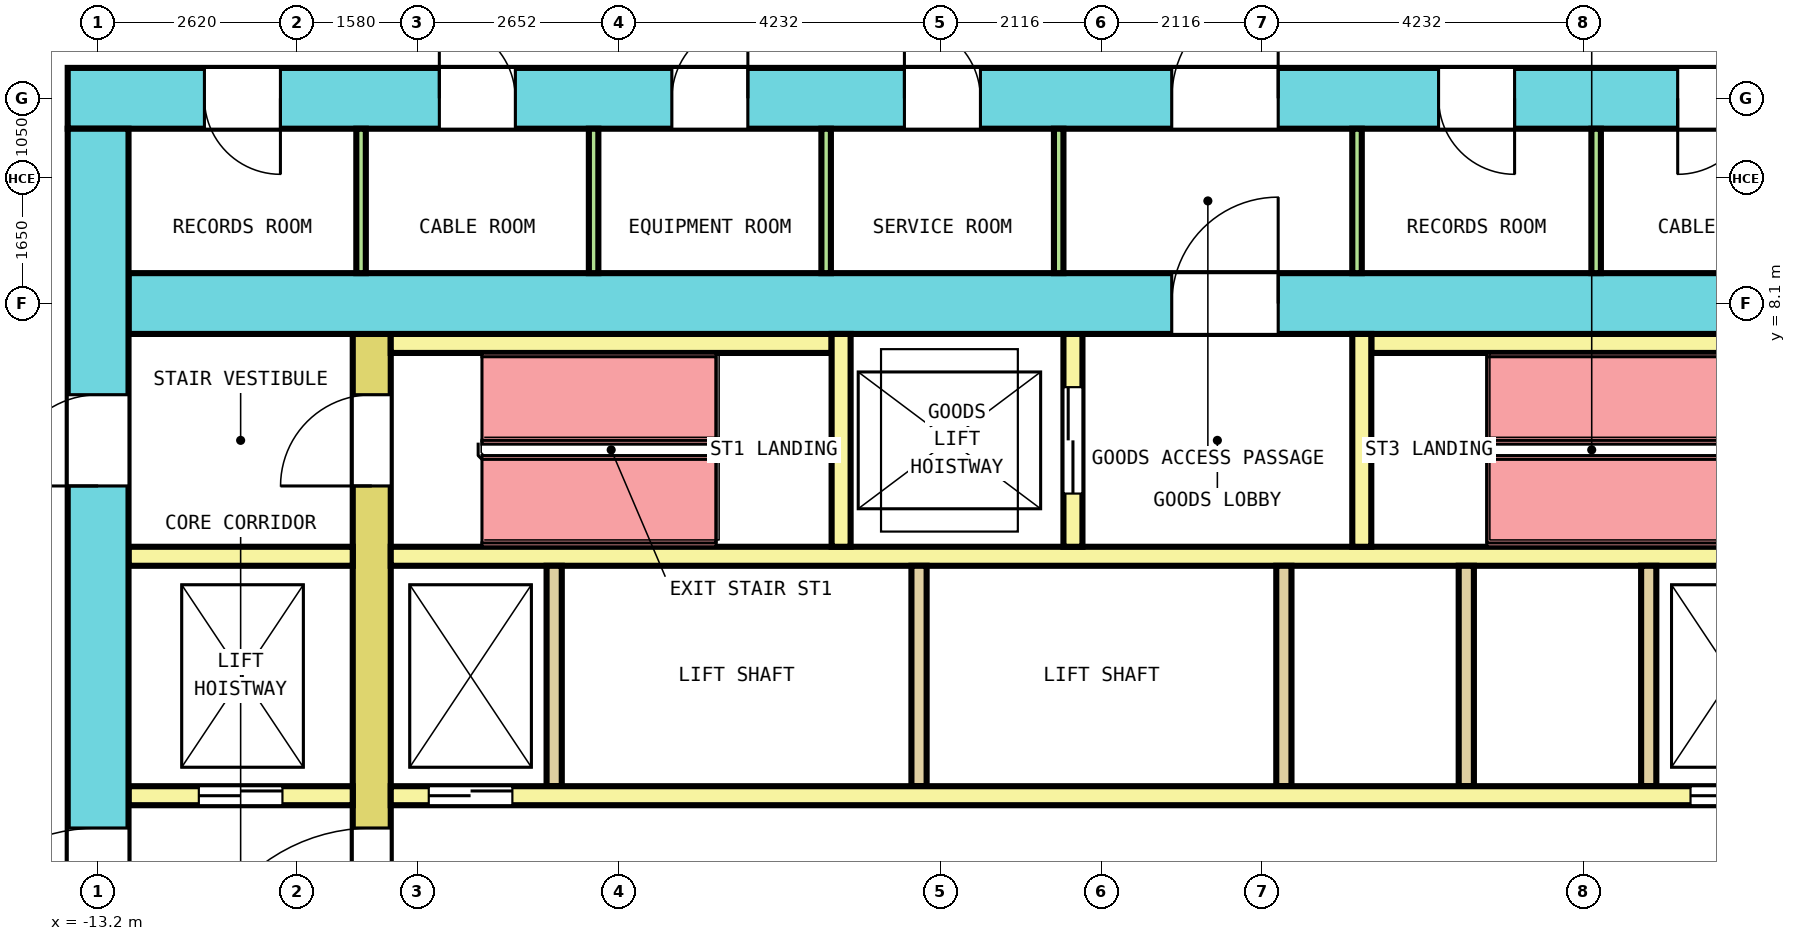
"""IFC4 building model, lengths in metres.
Left out: names, types, materials, properties, quantities, classifications, styles, units other than length and angle.
Written with IfcOpenShell. Run it as: python <this file> out.ifc"""

import sys

from ifc_helpers import new_model, si_unit, direction, frame, frame_2d, origin, place, context, subcontext, project, spatial, rectangle, extrude, element, fill, save


model = new_model("IFC4")
c1 = context("Model", 3, precision=1e-05, world=origin(), true_north=direction((0.0, 1.0)))
c2 = subcontext(c1, "Body", "Model", "MODEL_VIEW")
j1 = project(units=[si_unit("LENGTHUNIT", "METRE"), si_unit("PLANEANGLEUNIT", "RADIAN")], contexts=[c1])
p1 = place(None, origin())
s1 = spatial("IfcSite", under=j1, at=p1, CompositionType="ELEMENT")
p2 = place(p1, origin())
s2 = spatial("IfcBuilding", under=s1, at=p2, CompositionType="ELEMENT")
p3 = place(p2, frame((0.0, 0.0, 94.0)))
s3 = spatial("IfcBuildingStorey", under=s2, at=p3, CompositionType="ELEMENT", Elevation=94.0)
p4 = place(p3, frame((-13.6, 10.8, 0.0), z_axis=(0.0, 0.0, 1.0), x_axis=(1.0, 0.0, 0.0)))
e1 = element("IfcWall", 1, at=p4, inside=s3, PredefinedType="SHEAR", context=c2, shape_type="SweptSolid", body=[
    extrude(rectangle(XDim=27.2, YDim=0.8, at=frame_2d((13.6, 0.0))), origin(), (0.0, 0.0, 1.0), 4.1),
])
p5 = place(p4, frame((1.798, 0.0, 0.0)))
e2 = element("IfcOpeningElement", 2, at=p5, cuts=e1, PredefinedType="OPENING", context=c2, shape_type="SweptSolid", body=[
    extrude(rectangle(XDim=1.0, YDim=2.1, at=frame_2d((0.5, 1.05))), frame((0.0, 0.41, 0.0), z_axis=(0.0, -1.0, 0.0), x_axis=(1.0, 0.0, 0.0)), (0.0, 0.0, 1.0), 0.82),
])
p6 = place(p4, frame((4.889, 0.0, 0.0)))
e3 = element("IfcOpeningElement", 3, at=p6, cuts=e1, PredefinedType="OPENING", context=c2, shape_type="SweptSolid", body=[
    extrude(rectangle(XDim=1.0, YDim=2.1, at=frame_2d((0.5, 1.05))), frame((0.0, 0.41, 0.0), z_axis=(0.0, -1.0, 0.0), x_axis=(1.0, 0.0, 0.0)), (0.0, 0.0, 1.0), 0.82),
])
p7 = place(p4, frame((7.948, 0.0, 0.0)))
e4 = element("IfcOpeningElement", 4, at=p7, cuts=e1, PredefinedType="OPENING", context=c2, shape_type="SweptSolid", body=[
    extrude(rectangle(XDim=1.0, YDim=2.1, at=frame_2d((0.5, 1.05))), frame((0.0, 0.41, 0.0), z_axis=(0.0, -1.0, 0.0), x_axis=(1.0, 0.0, 0.0)), (0.0, 0.0, 1.0), 0.82),
])
p8 = place(p4, frame((11.008, 0.0, 0.0)))
e5 = element("IfcOpeningElement", 5, at=p8, cuts=e1, PredefinedType="OPENING", context=c2, shape_type="SweptSolid", body=[
    extrude(rectangle(XDim=1.0, YDim=2.1, at=frame_2d((0.5, 1.05))), frame((0.0, 0.41, 0.0), z_axis=(0.0, -1.0, 0.0), x_axis=(1.0, 0.0, 0.0)), (0.0, 0.0, 1.0), 0.82),
])
p9 = place(p4, frame((18.035, 0.0, 0.0)))
e6 = element("IfcOpeningElement", 6, at=p9, cuts=e1, PredefinedType="OPENING", context=c2, shape_type="SweptSolid", body=[
    extrude(rectangle(XDim=1.0, YDim=2.1, at=frame_2d((0.5, 1.05))), frame((0.0, 0.41, 0.0), z_axis=(0.0, -1.0, 0.0), x_axis=(1.0, 0.0, 0.0)), (0.0, 0.0, 1.0), 0.82),
])
p10 = place(p4, frame((21.181, 0.0, 0.0)))
e7 = element("IfcOpeningElement", 7, at=p10, cuts=e1, PredefinedType="OPENING", context=c2, shape_type="SweptSolid", body=[
    extrude(rectangle(XDim=1.0, YDim=2.1, at=frame_2d((0.5, 1.05))), frame((0.0, 0.41, 0.0), z_axis=(0.0, -1.0, 0.0), x_axis=(1.0, 0.0, 0.0)), (0.0, 0.0, 1.0), 0.82),
])
p11 = place(p4, frame((24.358, 0.0, 0.0)))
e8 = element("IfcOpeningElement", 8, at=p11, cuts=e1, PredefinedType="OPENING", context=c2, shape_type="SweptSolid", body=[
    extrude(rectangle(XDim=1.0, YDim=2.1, at=frame_2d((0.5, 1.05))), frame((0.0, 0.41, 0.0), z_axis=(0.0, -1.0, 0.0), x_axis=(1.0, 0.0, 0.0)), (0.0, 0.0, 1.0), 0.82),
])
p12 = place(p4, frame((14.525, 0.0, 0.0)))
e9 = element("IfcOpeningElement", 9, at=p12, cuts=e1, PredefinedType="OPENING", context=c2, shape_type="SweptSolid", body=[
    extrude(rectangle(XDim=1.4, YDim=2.1, at=frame_2d((0.7, 1.05))), frame((0.0, 0.41, 0.0), z_axis=(0.0, -1.0, 0.0), x_axis=(1.0, 0.0, 0.0)), (0.0, 0.0, 1.0), 0.82),
])
p13 = place(p3, frame((-13.2, -10.4, 0.0), z_axis=(0.0, 0.0, 1.0), x_axis=(0.0, 1.0, 0.0)))
e10 = element("IfcWall", 10, at=p13, inside=s3, PredefinedType="SHEAR", context=c2, shape_type="SweptSolid", body=[
    extrude(rectangle(XDim=20.8, YDim=0.8, at=frame_2d((10.4, 0.0))), origin(), (0.0, 0.0, 1.0), 4.1),
])
p14 = place(p13, frame((9.2, 0.0, 0.0)))
e11 = element("IfcOpeningElement", 11, at=p14, cuts=e10, PredefinedType="OPENING", context=c2, shape_type="SweptSolid", body=[
    extrude(rectangle(XDim=2.4, YDim=2.1, at=frame_2d((1.2, 1.05))), frame((0.0, 0.41, 0.0), z_axis=(0.0, -1.0, 0.0), x_axis=(1.0, 0.0, 0.0)), (0.0, 0.0, 1.0), 0.82),
])
p15 = place(p13, frame((16.1, 0.0, 0.0)))
e12 = element("IfcOpeningElement", 12, at=p15, cuts=e10, PredefinedType="OPENING", context=c2, shape_type="SweptSolid", body=[
    extrude(rectangle(XDim=1.2, YDim=2.1, at=frame_2d((0.6, 1.05))), frame((0.0, 0.41, 0.0), z_axis=(0.0, -1.0, 0.0), x_axis=(1.0, 0.0, 0.0)), (0.0, 0.0, 1.0), 0.82),
])
p16 = place(p13, frame((3.5, 0.0, 0.0)))
e13 = element("IfcOpeningElement", 13, at=p16, cuts=e10, PredefinedType="OPENING", context=c2, shape_type="SweptSolid", body=[
    extrude(rectangle(XDim=1.2, YDim=2.1, at=frame_2d((0.6, 1.05))), frame((0.0, 0.41, 0.0), z_axis=(0.0, -1.0, 0.0), x_axis=(1.0, 0.0, 0.0)), (0.0, 0.0, 1.0), 0.82),
])
p17 = place(p3, frame((-12.8, 8.1, 0.0), z_axis=(0.0, 0.0, 1.0), x_axis=(1.0, 0.0, 0.0)))
e14 = element("IfcWall", 14, at=p17, inside=s3, PredefinedType="SHEAR", context=c2, shape_type="SweptSolid", body=[
    extrude(rectangle(XDim=25.6, YDim=0.8, at=frame_2d((12.8, 0.0))), origin(), (0.0, 0.0, 1.0), 4.1),
])
p18 = place(p17, frame((13.725, 0.0, 0.0)))
e15 = element("IfcOpeningElement", 15, at=p18, cuts=e14, PredefinedType="OPENING", context=c2, shape_type="SweptSolid", body=[
    extrude(rectangle(XDim=1.4, YDim=2.1, at=frame_2d((0.7, 1.05))), frame((0.0, 0.41, 0.0), z_axis=(0.0, -1.0, 0.0), x_axis=(1.0, 0.0, 0.0)), (0.0, 0.0, 1.0), 0.82),
])
p19 = place(p3, frame((-9.6, -7.7, 0.0), z_axis=(0.0, 0.0, 1.0), x_axis=(0.0, 1.0, 0.0)))
e16 = element("IfcWall", 16, at=p19, inside=s3, PredefinedType="SHEAR", context=c2, shape_type="SweptSolid", body=[
    extrude(rectangle(XDim=15.4, YDim=0.5, at=frame_2d((7.7, 0.0))), origin(), (0.0, 0.0, 1.0), 4.1),
])
p20 = place(p19, frame((6.5, 0.0, 0.0)))
e17 = element("IfcOpeningElement", 17, at=p20, cuts=e16, PredefinedType="OPENING", context=c2, shape_type="SweptSolid", body=[
    extrude(rectangle(XDim=2.4, YDim=2.1, at=frame_2d((1.2, 1.05))), frame((0.0, 0.26, 0.0), z_axis=(0.0, -1.0, 0.0), x_axis=(1.0, 0.0, 0.0)), (0.0, 0.0, 1.0), 0.52),
])
p21 = place(p19, frame((13.4, 0.0, 0.0)))
e18 = element("IfcOpeningElement", 18, at=p21, cuts=e16, PredefinedType="OPENING", context=c2, shape_type="SweptSolid", body=[
    extrude(rectangle(XDim=1.2, YDim=2.1, at=frame_2d((0.6, 1.05))), frame((0.0, 0.26, 0.0), z_axis=(0.0, -1.0, 0.0), x_axis=(1.0, 0.0, 0.0)), (0.0, 0.0, 1.0), 0.52),
])
p22 = place(p19, frame((0.8, 0.0, 0.0)))
e19 = element("IfcOpeningElement", 19, at=p22, cuts=e16, PredefinedType="OPENING", context=c2, shape_type="SweptSolid", body=[
    extrude(rectangle(XDim=1.2, YDim=2.1, at=frame_2d((0.6, 1.05))), frame((0.0, 0.26, 0.0), z_axis=(0.0, -1.0, 0.0), x_axis=(1.0, 0.0, 0.0)), (0.0, 0.0, 1.0), 0.52),
])
p23 = place(p3, frame((-12.8, 1.625, 0.0), z_axis=(0.0, 0.0, 1.0), x_axis=(1.0, 0.0, 0.0)))
e20 = element("IfcWall", 20, at=p23, inside=s3, PredefinedType="SOLIDWALL", context=c2, shape_type="SweptSolid", body=[
    extrude(rectangle(XDim=2.95, YDim=0.25, at=frame_2d((1.475, 0.0))), origin(), (0.0, 0.0, 1.0), 4.1),
])
p24 = place(p23, frame((0.925, 0.0, 0.0)))
e21 = element("IfcOpeningElement", 21, at=p24, cuts=e20, PredefinedType="OPENING", context=c2, shape_type="SweptSolid", body=[
    extrude(rectangle(XDim=1.1, YDim=2.1, at=frame_2d((0.55, 1.05))), frame((0.0, 0.135, 0.0), z_axis=(0.0, -1.0, 0.0), x_axis=(1.0, 0.0, 0.0)), (0.0, 0.0, 1.0), 0.27),
])
p25 = place(p3, frame((-9.35, 1.625, 0.0), z_axis=(0.0, 0.0, 1.0), x_axis=(1.0, 0.0, 0.0)))
e22 = element("IfcWall", 22, at=p25, inside=s3, PredefinedType="SOLIDWALL", context=c2, shape_type="SweptSolid", body=[
    extrude(rectangle(XDim=18.7, YDim=0.25, at=frame_2d((9.35, 0.0))), origin(), (0.0, 0.0, 1.0), 4.1),
])
p26 = place(p25, frame((0.5, 0.0, 0.0)))
e23 = element("IfcOpeningElement", 23, at=p26, cuts=e22, PredefinedType="OPENING", context=c2, shape_type="SweptSolid", body=[
    extrude(rectangle(XDim=1.1, YDim=2.1, at=frame_2d((0.55, 1.05))), frame((0.0, 0.135, 0.0), z_axis=(0.0, -1.0, 0.0), x_axis=(1.0, 0.0, 0.0)), (0.0, 0.0, 1.0), 0.27),
])
p27 = place(p25, frame((17.1, 0.0, 0.0)))
e24 = element("IfcOpeningElement", 24, at=p27, cuts=e22, PredefinedType="OPENING", context=c2, shape_type="SweptSolid", body=[
    extrude(rectangle(XDim=1.1, YDim=2.1, at=frame_2d((0.55, 1.05))), frame((0.0, 0.135, 0.0), z_axis=(0.0, -1.0, 0.0), x_axis=(1.0, 0.0, 0.0)), (0.0, 0.0, 1.0), 0.27),
])
p28 = place(p3, frame((-12.8, 4.775, 0.0), z_axis=(0.0, 0.0, 1.0), x_axis=(1.0, 0.0, 0.0)))
e25 = element("IfcWall", 25, at=p28, inside=s3, PredefinedType="SOLIDWALL", context=c2, shape_type="SweptSolid", body=[
    extrude(rectangle(XDim=2.95, YDim=0.25, at=frame_2d((1.475, 0.0))), origin(), (0.0, 0.0, 1.0), 4.1),
])
p29 = place(p3, frame((-9.35, 4.775, 0.0), z_axis=(0.0, 0.0, 1.0), x_axis=(1.0, 0.0, 0.0)))
e26 = element("IfcWall", 26, at=p29, inside=s3, PredefinedType="SOLIDWALL", context=c2, shape_type="SweptSolid", body=[
    extrude(rectangle(XDim=18.7, YDim=0.25, at=frame_2d((9.35, 0.0))), origin(), (0.0, 0.0, 1.0), 4.1),
])
for number, where, z_axis, x_axis in (
    (27, (-7.2, 1.75, 0.0), (0.0, 0.0, 1.0), (0.0, 1.0, 0.0)),
    (28, (-2.4, 1.75, 0.0), (0.0, 0.0, 1.0), (0.0, 1.0, 0.0)),
    (29, (2.4, 1.75, 0.0), (0.0, 0.0, 1.0), (0.0, 1.0, 0.0)),
    (30, (4.8, 1.75, 0.0), (0.0, 0.0, 1.0), (0.0, 1.0, 0.0)),
    (31, (7.2, 1.75, 0.0), (0.0, 0.0, 1.0), (0.0, 1.0, 0.0)),
):
    element("IfcWall", number, at=place(p3, frame(where, z_axis=z_axis, x_axis=x_axis)), inside=s3, PredefinedType="SOLIDWALL", context=c2, shape_type="SweptSolid", body=[
        extrude(rectangle(XDim=2.9, YDim=0.2, at=frame_2d((1.45, 0.0))), origin(), (0.0, 0.0, 1.0), 4.1),
    ])
for number, where, z_axis, x_axis in (
    (32, (-9.35, 7.575, 0.0), (0.0, 0.0, 1.0), (1.0, 0.0, 0.0)),
    (33, (3.55, 7.575, 0.0), (0.0, 0.0, 1.0), (1.0, 0.0, 0.0)),
):
    element("IfcWall", number, at=place(p3, frame(where, z_axis=z_axis, x_axis=x_axis)), inside=s3, PredefinedType="SOLIDWALL", context=c2, shape_type="SweptSolid", body=[
        extrude(rectangle(XDim=5.8, YDim=0.25, at=frame_2d((2.9, 0.0))), origin(), (0.0, 0.0, 1.0), 4.1),
    ])
p30 = place(p3, frame((-3.425, 4.9, 0.0), z_axis=(0.0, 0.0, 1.0), x_axis=(0.0, 1.0, 0.0)))
e34 = element("IfcWall", 34, at=p30, inside=s3, PredefinedType="SOLIDWALL", context=c2, shape_type="SweptSolid", body=[
    extrude(rectangle(XDim=2.8, YDim=0.25, at=frame_2d((1.4, 0.0))), origin(), (0.0, 0.0, 1.0), 4.1),
])
p31 = place(p3, frame((-0.375, 4.9, 0.0), z_axis=(0.0, 0.0, 1.0), x_axis=(0.0, 1.0, 0.0)))
e35 = element("IfcWall", 35, at=p31, inside=s3, PredefinedType="SOLIDWALL", context=c2, shape_type="SweptSolid", body=[
    extrude(rectangle(XDim=2.8, YDim=0.25, at=frame_2d((1.4, 0.0))), origin(), (0.0, 0.0, 1.0), 4.1),
])
p32 = place(p31, frame((0.7, 0.0, 0.0)))
e36 = element("IfcOpeningElement", 36, at=p32, cuts=e35, PredefinedType="OPENING", context=c2, shape_type="SweptSolid", body=[
    extrude(rectangle(XDim=1.4, YDim=2.1, at=frame_2d((0.7, 1.05))), frame((0.0, 0.135, 0.0), z_axis=(0.0, -1.0, 0.0), x_axis=(1.0, 0.0, 0.0)), (0.0, 0.0, 1.0), 0.27),
])
p33 = place(p3, frame((3.425, 4.9, 0.0), z_axis=(0.0, 0.0, 1.0), x_axis=(0.0, 1.0, 0.0)))
e37 = element("IfcWall", 37, at=p33, inside=s3, PredefinedType="SOLIDWALL", context=c2, shape_type="SweptSolid", body=[
    extrude(rectangle(XDim=2.8, YDim=0.25, at=frame_2d((1.4, 0.0))), origin(), (0.0, 0.0, 1.0), 4.1),
])
for number, where, z_axis, x_axis in (
    (38, (-9.74, 8.5, 0.0), (0.0, 0.0, 1.0), (0.0, 1.0, 0.0)),
    (39, (-6.681, 8.5, 0.0), (0.0, 0.0, 1.0), (0.0, 1.0, 0.0)),
    (40, (-3.622, 8.5, 0.0), (0.0, 0.0, 1.0), (0.0, 1.0, 0.0)),
    (41, (-0.562, 8.5, 0.0), (0.0, 0.0, 1.0), (0.0, 1.0, 0.0)),
    (42, (3.363, 8.5, 0.0), (0.0, 0.0, 1.0), (0.0, 1.0, 0.0)),
    (43, (6.508, 8.5, 0.0), (0.0, 0.0, 1.0), (0.0, 1.0, 0.0)),
):
    element("IfcWall", number, at=place(p3, frame(where, z_axis=z_axis, x_axis=x_axis)), inside=s3, PredefinedType="PARTITIONING", context=c2, shape_type="SweptSolid", body=[
        extrude(rectangle(XDim=1.9, YDim=0.125, at=frame_2d((0.95, 0.0))), origin(), (0.0, 0.0, 1.0), 4.1),
    ])
p34 = place(p24, origin())
e44 = element("IfcDoor", 44, at=p34, inside=s3, OperationType="DOUBLE_DOOR_SLIDING", PredefinedType="DOOR", context=c2, shape_type="SweptSolid", body=[
    extrude(rectangle(XDim=1.1, YDim=2.1, at=frame_2d((0.55, 1.05))), frame((0.0, 0.075, 0.0), z_axis=(0.0, -1.0, 0.0), x_axis=(1.0, 0.0, 0.0)), (0.0, 0.0, 1.0), 0.15),
])
fill(e21, e44)
p35 = place(p26, origin())
e45 = element("IfcDoor", 45, at=p35, inside=s3, OperationType="DOUBLE_DOOR_SLIDING", PredefinedType="DOOR", context=c2, shape_type="SweptSolid", body=[
    extrude(rectangle(XDim=1.1, YDim=2.1, at=frame_2d((0.55, 1.05))), frame((0.0, 0.075, 0.0), z_axis=(0.0, -1.0, 0.0), x_axis=(1.0, 0.0, 0.0)), (0.0, 0.0, 1.0), 0.15),
])
fill(e23, e45)
p36 = place(p27, origin())
e46 = element("IfcDoor", 46, at=p36, inside=s3, OperationType="DOUBLE_DOOR_SLIDING", PredefinedType="DOOR", context=c2, shape_type="SweptSolid", body=[
    extrude(rectangle(XDim=1.1, YDim=2.1, at=frame_2d((0.55, 1.05))), frame((0.0, 0.075, 0.0), z_axis=(0.0, -1.0, 0.0), x_axis=(1.0, 0.0, 0.0)), (0.0, 0.0, 1.0), 0.15),
])
fill(e24, e46)
p37 = place(p32, origin())
e47 = element("IfcDoor", 47, at=p37, inside=s3, OperationType="DOUBLE_DOOR_SLIDING", PredefinedType="DOOR", context=c2, shape_type="SweptSolid", body=[
    extrude(rectangle(XDim=1.4, YDim=2.1, at=frame_2d((0.7, 1.05))), frame((0.0, 0.075, 0.0), z_axis=(0.0, -1.0, 0.0), x_axis=(1.0, 0.0, 0.0)), (0.0, 0.0, 1.0), 0.15),
])
fill(e36, e47)
p38 = place(p20, origin())
e48 = element("IfcDoor", 48, at=p38, inside=s3, OperationType="DOUBLE_DOOR_SINGLE_SWING", PredefinedType="DOOR", context=c2, shape_type="SweptSolid", body=[
    extrude(rectangle(XDim=2.4, YDim=2.1, at=frame_2d((1.2, 1.05))), frame((0.0, 0.2, 0.0), z_axis=(0.0, -1.0, 0.0), x_axis=(1.0, 0.0, 0.0)), (0.0, 0.0, 1.0), 0.4),
])
fill(e17, e48)
p39 = place(p14, origin())
e49 = element("IfcDoor", 49, at=p39, inside=s3, OperationType="DOUBLE_DOOR_SINGLE_SWING", PredefinedType="DOOR", context=c2, shape_type="SweptSolid", body=[
    extrude(rectangle(XDim=2.4, YDim=2.1, at=frame_2d((1.2, 1.05))), frame((0.0, 0.3, 0.0), z_axis=(0.0, -1.0, 0.0), x_axis=(1.0, 0.0, 0.0)), (0.0, 0.0, 1.0), 0.6),
])
fill(e11, e49)
p40 = place(p21, origin())
e50 = element("IfcDoor", 50, at=p40, inside=s3, OperationType="SINGLE_SWING_LEFT", PredefinedType="DOOR", context=c2, shape_type="SweptSolid", body=[
    extrude(rectangle(XDim=1.2, YDim=2.1, at=frame_2d((0.6, 1.05))), frame((0.0, 0.2, 0.0), z_axis=(0.0, -1.0, 0.0), x_axis=(1.0, 0.0, 0.0)), (0.0, 0.0, 1.0), 0.4),
])
fill(e18, e50)
p41 = place(p15, origin())
e51 = element("IfcDoor", 51, at=p41, inside=s3, OperationType="SINGLE_SWING_RIGHT", PredefinedType="DOOR", context=c2, shape_type="SweptSolid", body=[
    extrude(rectangle(XDim=1.2, YDim=2.1, at=frame_2d((0.6, 1.05))), frame((0.0, 0.3, 0.0), z_axis=(0.0, -1.0, 0.0), x_axis=(1.0, 0.0, 0.0)), (0.0, 0.0, 1.0), 0.6),
])
fill(e12, e51)
p42 = place(p18, origin())
e52 = element("IfcDoor", 52, at=p42, inside=s3, OperationType="DOUBLE_DOOR_SINGLE_SWING", PredefinedType="DOOR", context=c2, shape_type="SweptSolid", body=[
    extrude(rectangle(XDim=1.4, YDim=2.1, at=frame_2d((0.7, 1.05))), frame((0.0, 0.3, 0.0), z_axis=(0.0, -1.0, 0.0), x_axis=(1.0, 0.0, 0.0)), (0.0, 0.0, 1.0), 0.6),
])
fill(e15, e52)
p43 = place(p5, origin())
e53 = element("IfcDoor", 53, at=p43, inside=s3, OperationType="SINGLE_SWING_LEFT", PredefinedType="DOOR", context=c2, shape_type="SweptSolid", body=[
    extrude(rectangle(XDim=1.0, YDim=2.1, at=frame_2d((0.5, 1.05))), frame((0.0, 0.3, 0.0), z_axis=(0.0, -1.0, 0.0), x_axis=(1.0, 0.0, 0.0)), (0.0, 0.0, 1.0), 0.6),
])
fill(e2, e53)
p44 = place(p6, origin())
e54 = element("IfcDoor", 54, at=p44, inside=s3, OperationType="SINGLE_SWING_RIGHT", PredefinedType="DOOR", context=c2, shape_type="SweptSolid", body=[
    extrude(rectangle(XDim=1.0, YDim=2.1, at=frame_2d((0.5, 1.05))), frame((0.0, 0.3, 0.0), z_axis=(0.0, -1.0, 0.0), x_axis=(1.0, 0.0, 0.0)), (0.0, 0.0, 1.0), 0.6),
])
fill(e3, e54)
p45 = place(p7, origin())
e55 = element("IfcDoor", 55, at=p45, inside=s3, OperationType="SINGLE_SWING_LEFT", PredefinedType="DOOR", context=c2, shape_type="SweptSolid", body=[
    extrude(rectangle(XDim=1.0, YDim=2.1, at=frame_2d((0.5, 1.05))), frame((0.0, 0.3, 0.0), z_axis=(0.0, -1.0, 0.0), x_axis=(1.0, 0.0, 0.0)), (0.0, 0.0, 1.0), 0.6),
])
fill(e4, e55)
p46 = place(p8, origin())
e56 = element("IfcDoor", 56, at=p46, inside=s3, OperationType="SINGLE_SWING_RIGHT", PredefinedType="DOOR", context=c2, shape_type="SweptSolid", body=[
    extrude(rectangle(XDim=1.0, YDim=2.1, at=frame_2d((0.5, 1.05))), frame((0.0, 0.3, 0.0), z_axis=(0.0, -1.0, 0.0), x_axis=(1.0, 0.0, 0.0)), (0.0, 0.0, 1.0), 0.6),
])
fill(e5, e56)
p47 = place(p9, origin())
e57 = element("IfcDoor", 57, at=p47, inside=s3, OperationType="SINGLE_SWING_LEFT", PredefinedType="DOOR", context=c2, shape_type="SweptSolid", body=[
    extrude(rectangle(XDim=1.0, YDim=2.1, at=frame_2d((0.5, 1.05))), frame((0.0, 0.3, 0.0), z_axis=(0.0, -1.0, 0.0), x_axis=(1.0, 0.0, 0.0)), (0.0, 0.0, 1.0), 0.6),
])
fill(e6, e57)
p48 = place(p10, origin())
e58 = element("IfcDoor", 58, at=p48, inside=s3, OperationType="SINGLE_SWING_RIGHT", PredefinedType="DOOR", context=c2, shape_type="SweptSolid", body=[
    extrude(rectangle(XDim=1.0, YDim=2.1, at=frame_2d((0.5, 1.05))), frame((0.0, 0.3, 0.0), z_axis=(0.0, -1.0, 0.0), x_axis=(1.0, 0.0, 0.0)), (0.0, 0.0, 1.0), 0.6),
])
fill(e7, e58)
p49 = place(p12, origin())
e59 = element("IfcDoor", 59, at=p49, inside=s3, OperationType="DOUBLE_DOOR_SINGLE_SWING", PredefinedType="DOOR", context=c2, shape_type="SweptSolid", body=[
    extrude(rectangle(XDim=1.4, YDim=2.1, at=frame_2d((0.7, 1.05))), frame((0.0, 0.3, 0.0), z_axis=(0.0, -1.0, 0.0), x_axis=(1.0, 0.0, 0.0)), (0.0, 0.0, 1.0), 0.6),
])
fill(e9, e59)
save(model, sys.argv[1])
